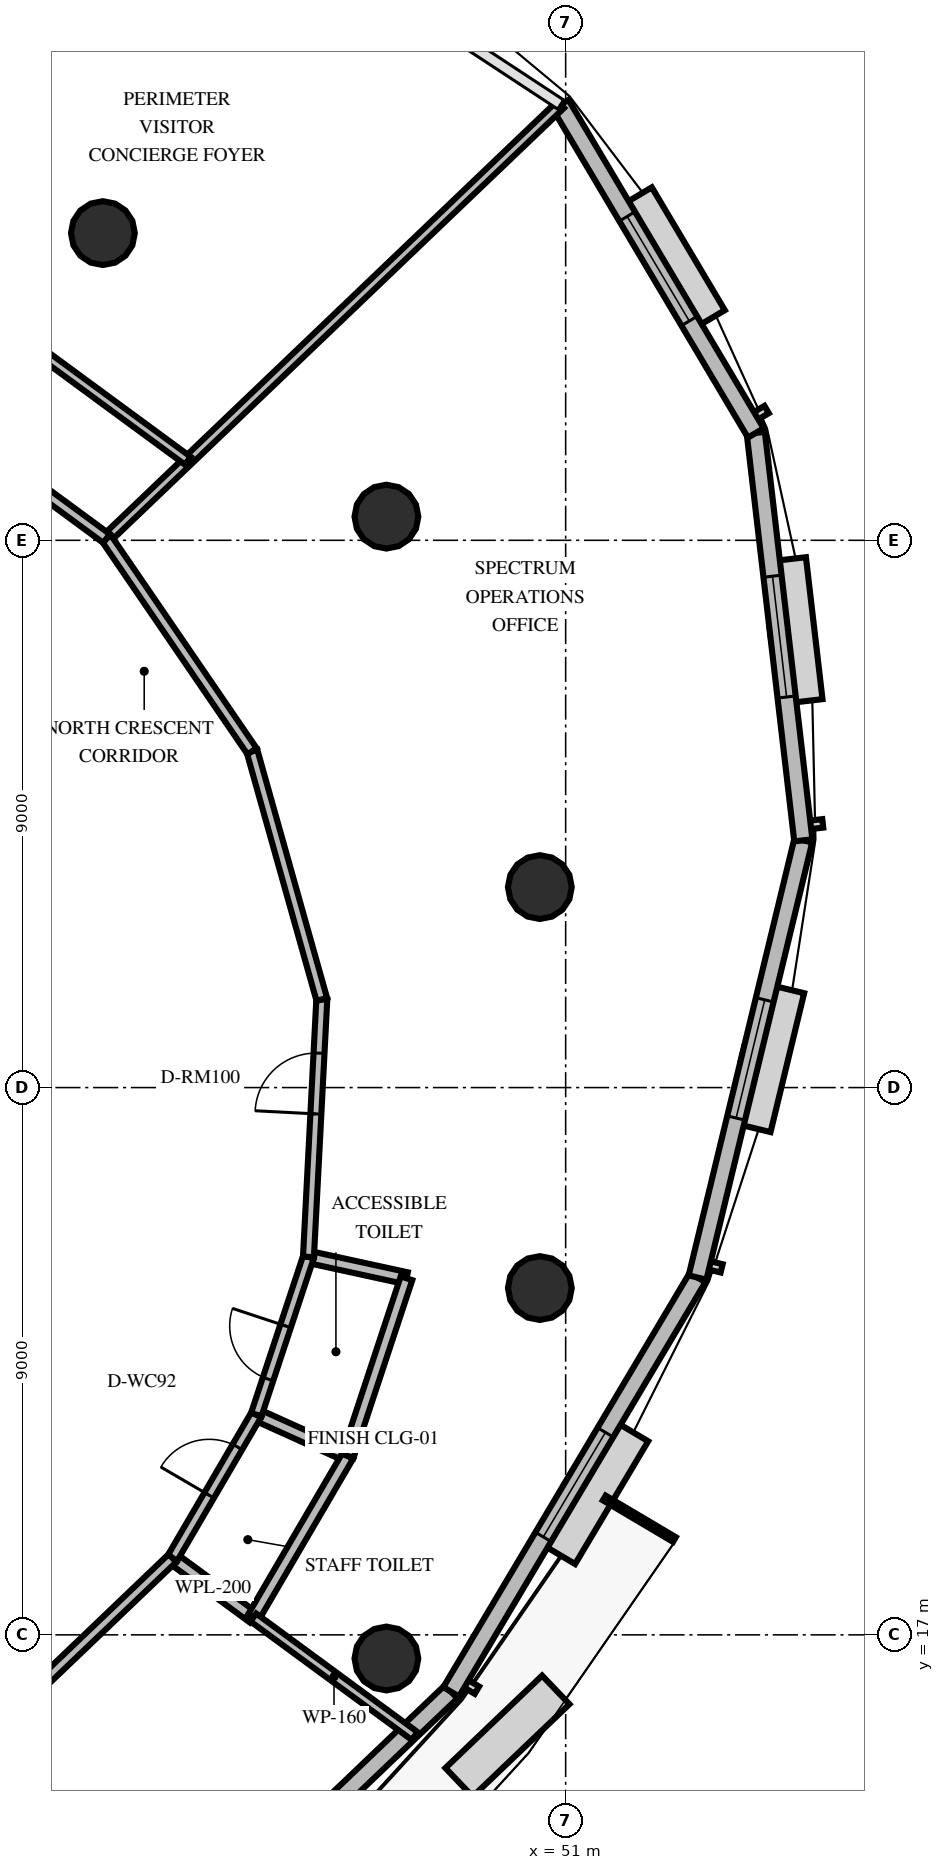
"""IFC4 building model, lengths in metres.
Left out: names, types, materials, properties, quantities, classifications, styles, units other than length and angle.
Written with IfcOpenShell. Run it as: python <this file> out.ifc"""

import sys

from ifc_helpers import new_model, si_unit, direction, frame, frame_2d, origin, origin_2d, place, context, subcontext, project, spatial, rectangle, circle, extrude, element, fill, save


model = new_model("IFC4")
c1 = context("Model", 3, precision=1e-05, world=origin(), true_north=direction((0.0, 1.0)))
c2 = subcontext(c1, "Body", "Model", "MODEL_VIEW")
j1 = project(units=[si_unit("LENGTHUNIT", "METRE"), si_unit("PLANEANGLEUNIT", "RADIAN")], contexts=[c1])
p1 = place(None, origin())
s1 = spatial("IfcSite", under=j1, at=p1, CompositionType="ELEMENT")
p2 = place(p1, origin())
s2 = spatial("IfcBuilding", under=s1, at=p2, CompositionType="ELEMENT")
p3 = place(p2, frame((0.0, 0.0, 213.2)))
s3 = spatial("IfcBuildingStorey", under=s2, at=p3, CompositionType="ELEMENT", Elevation=213.2)
for number, where, z_axis, x_axis in (
    (1, (50.575, 29.297, 0.0), (0.0, 0.0, 1.0), (1.0, 0.0, 0.0)),
    (2, (48.052, 35.389, 0.0), (0.0, 0.0, 1.0), (1.0, 0.0, 0.0)),
    (3, (43.389, 40.052, 0.0), (0.0, 0.0, 1.0), (1.0, 0.0, 0.0)),
    (4, (48.052, 16.611, 0.0), (0.0, 0.0, 1.0), (1.0, 0.0, 0.0)),
    (5, (50.575, 22.703, 0.0), (0.0, 0.0, 1.0), (1.0, 0.0, 0.0)),
):
    element("IfcColumn", number, at=place(p3, frame(where, z_axis=z_axis, x_axis=x_axis)), inside=s3, PredefinedType="COLUMN", context=c2, shape_type="SweptSolid", body=[
        extrude(circle(Radius=0.525, at=origin_2d()), origin(), (0.0, 0.0, 1.0), 3.6),
    ])
p4 = place(p3, frame((43.241, 10.448, 0.0), z_axis=(0.0, 0.0, 1.0), x_axis=(0.722981687911, 0.690867193421, 0.0)))
e6 = element("IfcWall", 6, at=p4, inside=s3, PredefinedType="SOLIDWALL", context=c2, shape_type="SweptSolid", body=[
    extrude(rectangle(XDim=8.127, YDim=0.3, at=frame_2d((4.063, 0.0))), origin(), (0.0, 0.0, 1.0), 2.66),
])
p5 = place(p4, frame((3.95, 0.0, 0.0)))
e7 = element("IfcOpeningElement", 7, at=p5, cuts=e6, PredefinedType="OPENING", context=c2, shape_type="SweptSolid", body=[
    extrude(rectangle(XDim=1.05, YDim=2.15, at=frame_2d((0.525, 1.075))), frame((0.0, 0.16, 0.0), z_axis=(0.0, -1.0, 0.0), x_axis=(1.0, 0.0, 0.0)), (0.0, 0.0, 1.0), 0.32),
])
p6 = place(p3, frame((49.117, 16.063, 0.0), z_axis=(0.0, 0.0, 1.0), x_axis=(0.511158411117, 0.859486520397, 0.0)))
e8 = element("IfcWall", 8, at=p6, inside=s3, PredefinedType="SOLIDWALL", context=c2, shape_type="SweptSolid", body=[
    extrude(rectangle(XDim=7.927, YDim=0.3, at=frame_2d((3.963, 0.0))), origin(), (0.0, 0.0, 1.0), 2.66),
])
p7 = place(p6, frame((2.964, 0.0, 0.8)))
e9 = element("IfcOpeningElement", 9, at=p7, cuts=e8, PredefinedType="OPENING", context=c2, shape_type="SweptSolid", body=[
    extrude(rectangle(XDim=2.0, YDim=1.85, at=frame_2d((1.0, 0.925))), frame((0.0, 0.16, 0.0), z_axis=(0.0, -1.0, 0.0), x_axis=(1.0, 0.0, 0.0)), (0.0, 0.0, 1.0), 0.32),
])
p8 = place(p3, frame((53.169, 22.876, 0.0), z_axis=(0.0, 0.0, 1.0), x_axis=(0.235213672282, 0.971943685803, 0.0)))
e10 = element("IfcWall", 10, at=p8, inside=s3, PredefinedType="SOLIDWALL", context=c2, shape_type="SweptSolid", body=[
    extrude(rectangle(XDim=7.397, YDim=0.3, at=frame_2d((3.699, 0.0))), origin(), (0.0, 0.0, 1.0), 2.66),
])
p9 = place(p8, frame((2.699, 0.0, 0.8)))
e11 = element("IfcOpeningElement", 11, at=p9, cuts=e10, PredefinedType="OPENING", context=c2, shape_type="SweptSolid", body=[
    extrude(rectangle(XDim=2.0, YDim=1.85, at=frame_2d((1.0, 0.925))), frame((0.0, 0.16, 0.0), z_axis=(0.0, -1.0, 0.0), x_axis=(1.0, 0.0, 0.0)), (0.0, 0.0, 1.0), 0.32),
])
p10 = place(p3, frame((54.909, 30.066, 0.0), z_axis=(0.0, 0.0, 1.0), x_axis=(-0.1158961734, 0.993261333684, 0.0)))
e12 = element("IfcWall", 12, at=p10, inside=s3, PredefinedType="SOLIDWALL", context=c2, shape_type="SweptSolid", body=[
    extrude(rectangle(XDim=6.745, YDim=0.3, at=frame_2d((3.373, 0.0))), origin(), (0.0, 0.0, 1.0), 2.66),
])
p11 = place(p10, frame((2.373, 0.0, 0.8)))
e13 = element("IfcOpeningElement", 13, at=p11, cuts=e12, PredefinedType="OPENING", context=c2, shape_type="SweptSolid", body=[
    extrude(rectangle(XDim=2.0, YDim=1.85, at=frame_2d((1.0, 0.925))), frame((0.0, 0.16, 0.0), z_axis=(0.0, -1.0, 0.0), x_axis=(1.0, 0.0, 0.0)), (0.0, 0.0, 1.0), 0.32),
])
p12 = place(p3, frame((54.127, 36.766, 0.0), z_axis=(0.0, 0.0, 1.0), x_axis=(-0.510856559467, 0.859665967483, 0.0)))
e14 = element("IfcWall", 14, at=p12, inside=s3, PredefinedType="SOLIDWALL", context=c2, shape_type="SweptSolid", body=[
    extrude(rectangle(XDim=6.282, YDim=0.3, at=frame_2d((3.141, 0.0))), origin(), (0.0, 0.0, 1.0), 2.66),
])
p13 = place(p12, frame((2.141, 0.0, 0.8)))
e15 = element("IfcOpeningElement", 15, at=p13, cuts=e14, PredefinedType="OPENING", context=c2, shape_type="SweptSolid", body=[
    extrude(rectangle(XDim=2.0, YDim=1.85, at=frame_2d((1.0, 0.925))), frame((0.0, 0.16, 0.0), z_axis=(0.0, -1.0, 0.0), x_axis=(1.0, 0.0, 0.0)), (0.0, 0.0, 1.0), 0.32),
])
for number, where, z_axis, x_axis in (
    (16, (44.533, 18.262, 0.0), (0.0, 0.0, 1.0), (0.806, -0.592, 0.0)),
    (17, (45.912, 20.622, 0.0), (0.0, 0.0, 1.0), (0.911, -0.412, 0.0)),
):
    element("IfcWall", number, at=place(p3, frame(where, z_axis=z_axis, x_axis=x_axis)), inside=s3, PredefinedType="PLUMBINGWALL", context=c2, shape_type="SweptSolid", body=[
        extrude(rectangle(XDim=1.65, YDim=0.2, at=frame_2d((0.825, 0.0))), origin(), (0.0, 0.0, 1.0), 2.46),
    ])
p14 = place(p3, frame((45.863, 17.286, 0.0), z_axis=(0.0, 0.0, 1.0), x_axis=(0.504591060513, 0.863358478067, 0.0)))
e18 = element("IfcWall", 18, at=p14, inside=s3, PredefinedType="PLUMBINGWALL", context=c2, shape_type="SweptSolid", body=[
    extrude(rectangle(XDim=3.077, YDim=0.2, at=frame_2d((1.539, 0.0))), origin(), (0.0, 0.0, 1.0), 2.46),
])
p15 = place(p3, frame((44.533, 18.262, 0.0), z_axis=(0.0, 0.0, 1.0), x_axis=(0.504554179898, 0.863380031937, 0.0)))
e19 = element("IfcWall", 19, at=p15, inside=s3, PredefinedType="PARTITIONING", context=c2, shape_type="SweptSolid", body=[
    extrude(rectangle(XDim=2.732, YDim=0.18, at=frame_2d((1.366, 0.0))), origin(), (0.0, 0.0, 1.0), 2.46),
])
p16 = place(p15, frame((1.197, 0.0, 0.0)))
e20 = element("IfcOpeningElement", 20, at=p16, cuts=e19, PredefinedType="OPENING", context=c2, shape_type="SweptSolid", body=[
    extrude(rectangle(XDim=0.92, YDim=2.1, at=frame_2d((0.46, 1.05))), frame((0.0, 0.1, 0.0), z_axis=(0.0, -1.0, 0.0), x_axis=(1.0, 0.0, 0.0)), (0.0, 0.0, 1.0), 0.2),
])
p17 = place(p3, frame((46.77, 23.216, 0.0), z_axis=(0.0, 0.0, 1.0), x_axis=(0.97703592819, -0.21307462314, 0.0)))
e21 = element("IfcWall", 21, at=p17, inside=s3, PredefinedType="PLUMBINGWALL", context=c2, shape_type="SweptSolid", body=[
    extrude(rectangle(XDim=1.65, YDim=0.2, at=frame_2d((0.825, 0.0))), origin(), (0.0, 0.0, 1.0), 2.46),
])
p18 = place(p3, frame((47.416, 19.942, 0.0), z_axis=(0.0, 0.0, 1.0), x_axis=(0.313918257241, 0.949450013308, 0.0)))
e22 = element("IfcWall", 22, at=p18, inside=s3, PredefinedType="PLUMBINGWALL", context=c2, shape_type="SweptSolid", body=[
    extrude(rectangle(XDim=3.077, YDim=0.2, at=frame_2d((1.539, 0.0))), origin(), (0.0, 0.0, 1.0), 2.46),
])
p19 = place(p3, frame((45.912, 20.622, 0.0), z_axis=(0.0, 0.0, 1.0), x_axis=(0.313975259938, 0.949431164512, 0.0)))
e23 = element("IfcWall", 23, at=p19, inside=s3, PredefinedType="PARTITIONING", context=c2, shape_type="SweptSolid", body=[
    extrude(rectangle(XDim=2.732, YDim=0.18, at=frame_2d((1.366, 0.0))), origin(), (0.0, 0.0, 1.0), 2.46),
])
p20 = place(p19, frame((0.616, 0.0, 0.0)))
e24 = element("IfcOpeningElement", 24, at=p20, cuts=e23, PredefinedType="OPENING", context=c2, shape_type="SweptSolid", body=[
    extrude(rectangle(XDim=0.92, YDim=2.1, at=frame_2d((0.46, 1.05))), frame((0.0, 0.1, 0.0), z_axis=(0.0, -1.0, 0.0), x_axis=(1.0, 0.0, 0.0)), (0.0, 0.0, 1.0), 0.2),
])
p21 = place(p3, frame((45.863, 17.286, 0.0), z_axis=(0.0, 0.0, 1.0), x_axis=(0.805921519164, -0.592022385513, 0.0)))
e25 = element("IfcWall", 25, at=p21, inside=s3, PredefinedType="PARTITIONING", context=c2, shape_type="SweptSolid", body=[
    extrude(rectangle(XDim=3.293, YDim=0.16, at=frame_2d((1.646, 0.0))), origin(), (0.0, 0.0, 1.0), 2.46),
])
p22 = place(p3, frame((43.449, 35.03, 0.0), z_axis=(0.0, 0.0, 1.0), x_axis=(0.722972327668, 0.690876988636, 0.0)))
e26 = element("IfcWall", 26, at=p22, inside=s3, PredefinedType="PARTITIONING", context=c2, shape_type="SweptSolid", body=[
    extrude(rectangle(XDim=10.33, YDim=0.16, at=frame_2d((5.165, 0.0))), origin(), (0.0, 0.0, 1.0), 2.46),
])
p23 = place(p3, frame((46.77, 23.216, 0.0), z_axis=(0.0, 0.0, 1.0), x_axis=(0.051775905234, 0.998658728314, 0.0)))
e27 = element("IfcWall", 27, at=p23, inside=s3, PredefinedType="PARTITIONING", context=c2, shape_type="SweptSolid", body=[
    extrude(rectangle(XDim=4.239, YDim=0.18, at=frame_2d((2.12, 0.0))), origin(), (0.0, 0.0, 1.0), 2.46),
])
p24 = place(p23, frame((2.354, 0.0, 0.0)))
e28 = element("IfcOpeningElement", 28, at=p24, cuts=e27, PredefinedType="OPENING", context=c2, shape_type="SweptSolid", body=[
    extrude(rectangle(XDim=1.0, YDim=2.15, at=frame_2d((0.5, 1.075))), frame((0.0, 0.1, 0.0), z_axis=(0.0, -1.0, 0.0), x_axis=(1.0, 0.0, 0.0)), (0.0, 0.0, 1.0), 0.2),
])
p25 = place(p3, frame((46.99, 27.449, 0.0), z_axis=(0.0, 0.0, 1.0), x_axis=(-0.270603820054, 0.962690798009, 0.0)))
e29 = element("IfcWall", 29, at=p25, inside=s3, PredefinedType="PARTITIONING", context=c2, shape_type="SweptSolid", body=[
    extrude(rectangle(XDim=4.24, YDim=0.18, at=frame_2d((2.12, 0.0))), origin(), (0.0, 0.0, 1.0), 2.46),
])
p26 = place(p3, frame((45.842, 31.531, 0.0), z_axis=(0.0, 0.0, 1.0), x_axis=(-0.564496027552, 0.82543578483, 0.0)))
e30 = element("IfcWall", 30, at=p26, inside=s3, PredefinedType="PARTITIONING", context=c2, shape_type="SweptSolid", body=[
    extrude(rectangle(XDim=4.239, YDim=0.18, at=frame_2d((2.12, 0.0))), origin(), (0.0, 0.0, 1.0), 2.46),
])
p27 = place(p3, frame((43.449, 35.03, 0.0), z_axis=(0.0, 0.0, 1.0), x_axis=(-0.805924234129, 0.592018689606, 0.0)))
e31 = element("IfcWall", 31, at=p27, inside=s3, PredefinedType="PARTITIONING", context=c2, shape_type="SweptSolid", body=[
    extrude(rectangle(XDim=4.539, YDim=0.18, at=frame_2d((2.27, 0.0))), origin(), (0.0, 0.0, 1.0), 2.46),
])
p28 = place(p3, frame((44.787, 36.308, 0.0), z_axis=(0.0, 0.0, 1.0), x_axis=(-0.80594787713, 0.591986502675, 0.0)))
e32 = element("IfcWall", 32, at=p28, inside=s3, PredefinedType="PARTITIONING", context=c2, shape_type="SweptSolid", body=[
    extrude(rectangle(XDim=5.181, YDim=0.16, at=frame_2d((2.591, 0.0))), origin(), (0.0, 0.0, 1.0), 2.46),
])
p29 = place(p3, frame((41.252, 15.126, 0.0), z_axis=(0.0, 0.0, 1.0), x_axis=(0.722979348147, 0.690869641939, 0.0)))
e33 = element("IfcWall", 33, at=p29, inside=s3, PredefinedType="PARTITIONING", context=c2, shape_type="SweptSolid", body=[
    extrude(rectangle(XDim=4.539, YDim=0.18, at=frame_2d((2.27, 0.0))), origin(), (0.0, 0.0, 1.0), 2.46),
])
p30 = place(p7, origin())
e34 = element("IfcWindow", 34, at=p30, inside=s3, PartitioningType="SINGLE_PANEL", PredefinedType="WINDOW", context=c2, shape_type="SweptSolid", body=[
    extrude(rectangle(XDim=2.0, YDim=1.85, at=frame_2d((1.0, 0.925))), frame((0.0, 0.03, 0.0), z_axis=(0.0, -1.0, 0.0), x_axis=(1.0, 0.0, 0.0)), (0.0, 0.0, 1.0), 0.06),
])
fill(e9, e34)
p31 = place(p9, origin())
e35 = element("IfcWindow", 35, at=p31, inside=s3, PartitioningType="SINGLE_PANEL", PredefinedType="WINDOW", context=c2, shape_type="SweptSolid", body=[
    extrude(rectangle(XDim=2.0, YDim=1.85, at=frame_2d((1.0, 0.925))), frame((0.0, 0.03, 0.0), z_axis=(0.0, -1.0, 0.0), x_axis=(1.0, 0.0, 0.0)), (0.0, 0.0, 1.0), 0.06),
])
fill(e11, e35)
p32 = place(p11, origin())
e36 = element("IfcWindow", 36, at=p32, inside=s3, PartitioningType="SINGLE_PANEL", PredefinedType="WINDOW", context=c2, shape_type="SweptSolid", body=[
    extrude(rectangle(XDim=2.0, YDim=1.85, at=frame_2d((1.0, 0.925))), frame((0.0, 0.03, 0.0), z_axis=(0.0, -1.0, 0.0), x_axis=(1.0, 0.0, 0.0)), (0.0, 0.0, 1.0), 0.06),
])
fill(e13, e36)
p33 = place(p13, origin())
e37 = element("IfcWindow", 37, at=p33, inside=s3, PartitioningType="SINGLE_PANEL", PredefinedType="WINDOW", context=c2, shape_type="SweptSolid", body=[
    extrude(rectangle(XDim=2.0, YDim=1.85, at=frame_2d((1.0, 0.925))), frame((0.0, 0.03, 0.0), z_axis=(0.0, -1.0, 0.0), x_axis=(1.0, 0.0, 0.0)), (0.0, 0.0, 1.0), 0.06),
])
fill(e15, e37)
p34 = place(p16, origin())
e38 = element("IfcDoor", 38, at=p34, inside=s3, OperationType="SINGLE_SWING_LEFT", PredefinedType="DOOR", context=c2, shape_type="SweptSolid", body=[
    extrude(rectangle(XDim=0.92, YDim=2.1, at=frame_2d((0.46, 1.05))), frame((0.0, 0.025, 0.0), z_axis=(0.0, -1.0, 0.0), x_axis=(1.0, 0.0, 0.0)), (0.0, 0.0, 1.0), 0.05),
])
fill(e20, e38)
p35 = place(p20, origin())
e39 = element("IfcDoor", 39, at=p35, inside=s3, OperationType="SINGLE_SWING_RIGHT", PredefinedType="DOOR", context=c2, shape_type="SweptSolid", body=[
    extrude(rectangle(XDim=0.92, YDim=2.1, at=frame_2d((0.46, 1.05))), frame((0.0, 0.025, 0.0), z_axis=(0.0, -1.0, 0.0), x_axis=(1.0, 0.0, 0.0)), (0.0, 0.0, 1.0), 0.05),
])
fill(e24, e39)
p36 = place(p24, origin())
e40 = element("IfcDoor", 40, at=p36, inside=s3, OperationType="SINGLE_SWING_LEFT", PredefinedType="DOOR", context=c2, shape_type="SweptSolid", body=[
    extrude(rectangle(XDim=1.0, YDim=2.15, at=frame_2d((0.5, 1.075))), frame((0.0, 0.025, 0.0), z_axis=(0.0, -1.0, 0.0), x_axis=(1.0, 0.0, 0.0)), (0.0, 0.0, 1.0), 0.05),
])
fill(e28, e40)
save(model, sys.argv[1])
